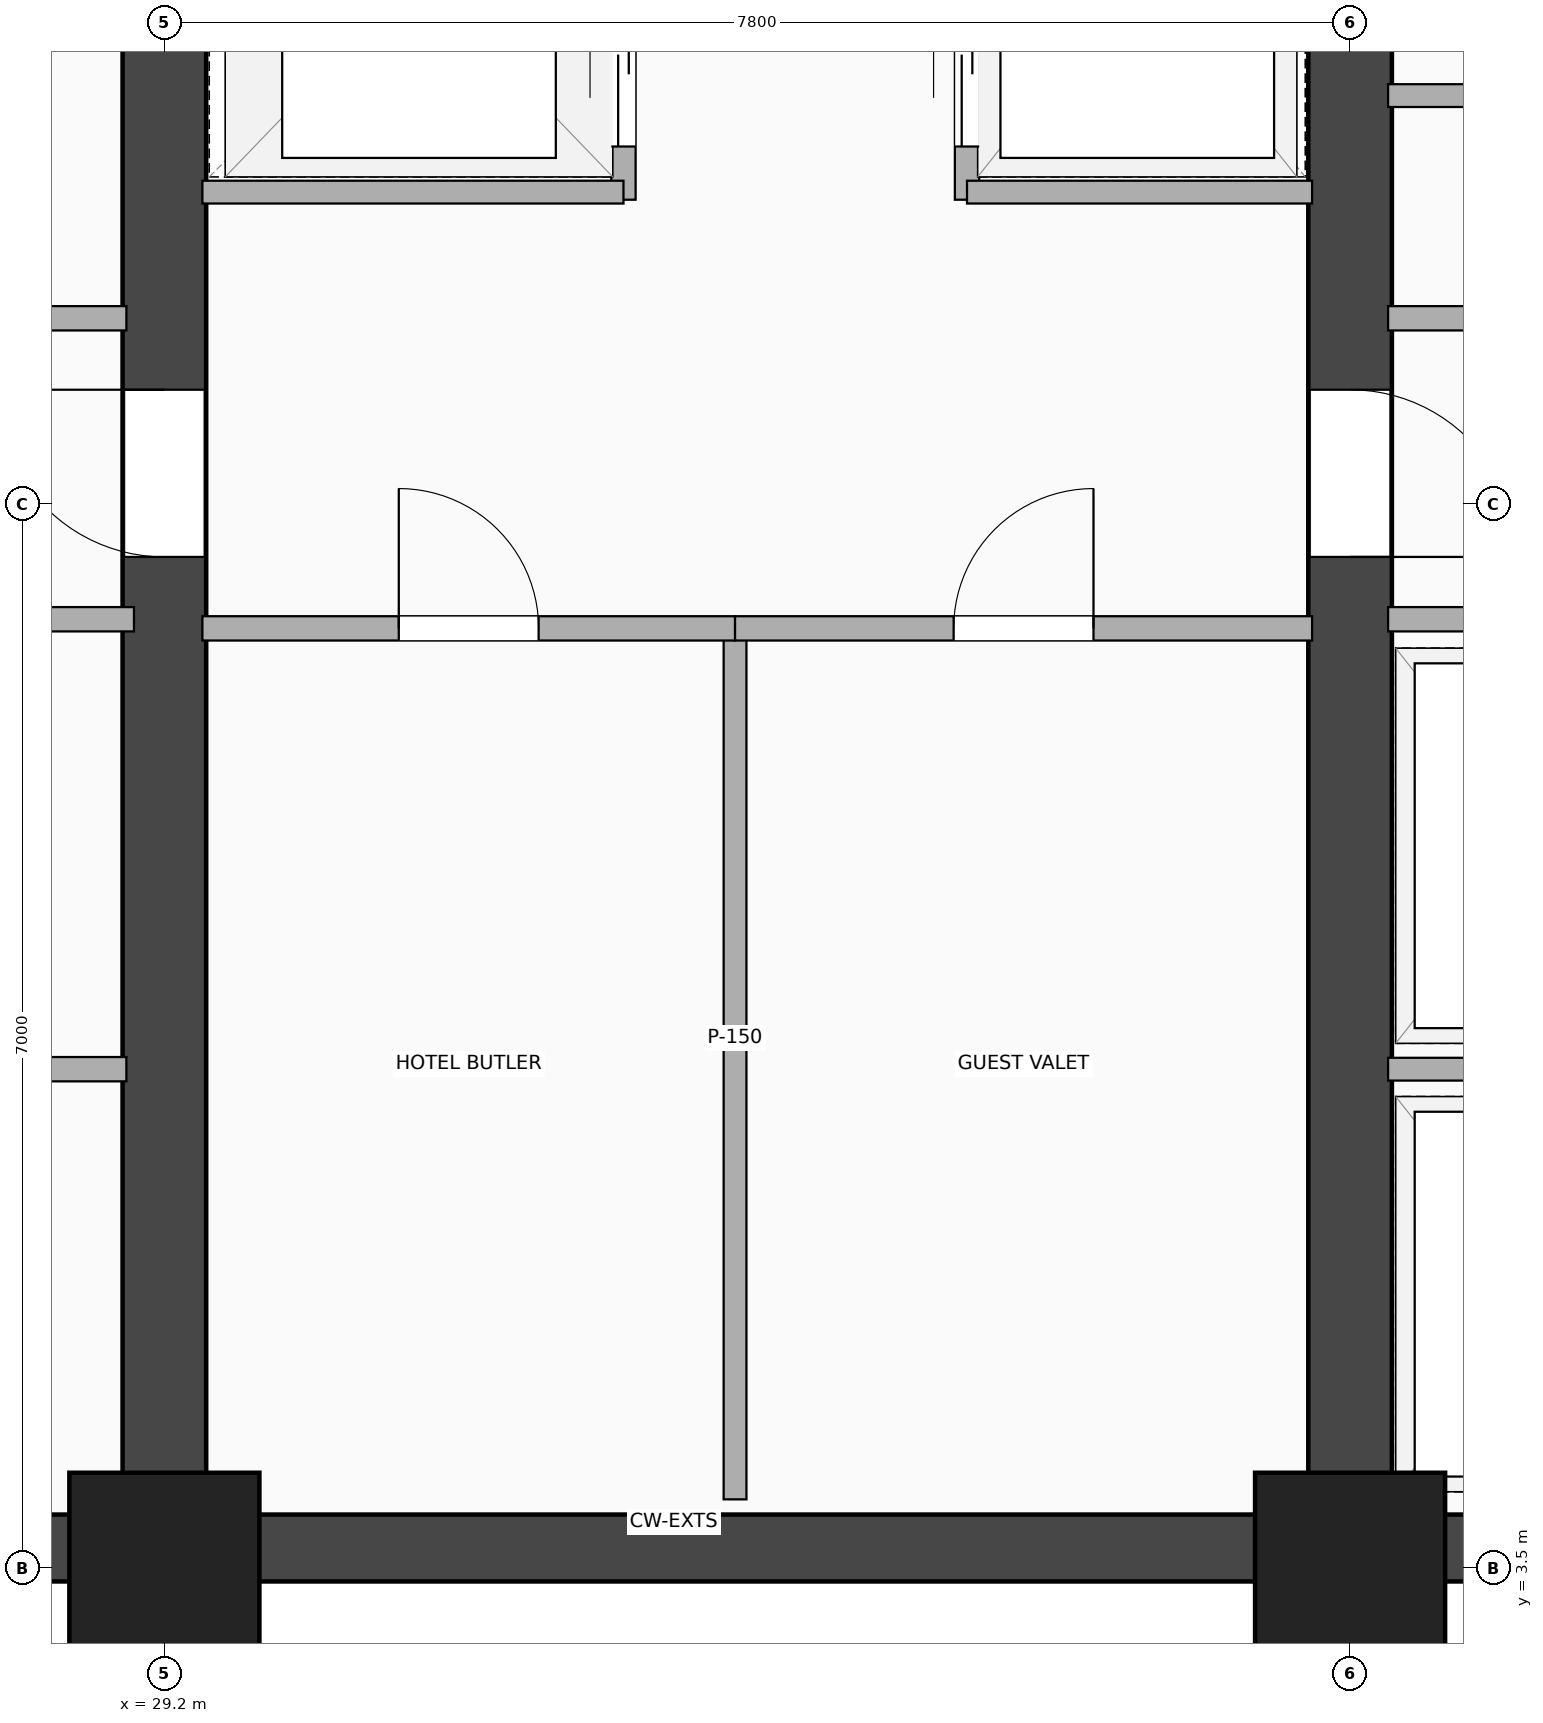
"""IFC4 building model, lengths in metres.
Left out: names, types, materials, properties, quantities, classifications, styles, units other than length and angle.
Written with IfcOpenShell. Run it as: python <this file> out.ifc"""

import sys

from ifc_helpers import new_model, si_unit, direction, frame, frame_2d, origin, origin_2d, place, context, subcontext, project, spatial, rectangle, extrude, element, fill, save


model = new_model("IFC4")
c1 = context("Model", 3, precision=1e-05, world=origin(), true_north=direction((0.0, 1.0)))
c2 = subcontext(c1, "Body", "Model", "MODEL_VIEW")
j1 = project(units=[si_unit("LENGTHUNIT", "METRE"), si_unit("PLANEANGLEUNIT", "RADIAN")], contexts=[c1])
p1 = place(None, origin())
s1 = spatial("IfcSite", under=j1, at=p1, CompositionType="ELEMENT")
p2 = place(p1, origin())
s2 = spatial("IfcBuilding", under=s1, at=p2, CompositionType="ELEMENT")
p3 = place(p2, frame((0.0, 0.0, 112.7)))
s3 = spatial("IfcBuildingStorey", under=s2, at=p3, CompositionType="ELEMENT", Elevation=112.7)
p4 = place(p3, frame((20.3, 3.63, 0.0), z_axis=(0.0, 0.0, 1.0), x_axis=(1.0, 0.0, 0.0)))
e1 = element("IfcWall", 1, at=p4, inside=s3, PredefinedType="SHEAR", context=c2, shape_type="SweptSolid", body=[
    extrude(rectangle(XDim=24.5, YDim=0.44, at=frame_2d((12.25, 0.0))), origin(), (0.0, 0.0, 1.0), 3.24),
])
p5 = place(p3, frame((29.2, 3.5, 0.0), z_axis=(0.0, 0.0, 1.0), x_axis=(0.0, 1.0, 0.0)))
e2 = element("IfcWall", 2, at=p5, inside=s3, PredefinedType="SHEAR", context=c2, shape_type="SweptSolid", body=[
    extrude(rectangle(XDim=16.9, YDim=0.55, at=frame_2d((8.45, 0.0))), origin(), (0.0, 0.0, 1.0), 3.24),
])
p6 = place(p5, frame((7.75, 0.0, 0.0), z_axis=(0.0, 0.0, 1.0), x_axis=(-1.0, 0.0, 0.0)))
e3 = element("IfcOpeningElement", 3, at=p6, cuts=e2, PredefinedType="OPENING", context=c2, shape_type="SweptSolid", body=[
    extrude(rectangle(XDim=1.1, YDim=2.15, at=frame_2d((0.55, 1.075))), frame((0.0, 0.285, 0.0), z_axis=(0.0, -1.0, 0.0), x_axis=(1.0, 0.0, 0.0)), (0.0, 0.0, 1.0), 0.57),
])
p7 = place(p3, frame((37.0, 3.5, 0.0), z_axis=(0.0, 0.0, 1.0), x_axis=(0.0, 1.0, 0.0)))
e4 = element("IfcWall", 4, at=p7, inside=s3, PredefinedType="SHEAR", context=c2, shape_type="SweptSolid", body=[
    extrude(rectangle(XDim=16.9, YDim=0.55, at=frame_2d((8.45, 0.0))), origin(), (0.0, 0.0, 1.0), 3.24),
])
p8 = place(p7, frame((6.65, 0.0, 0.0)))
e5 = element("IfcOpeningElement", 5, at=p8, cuts=e4, PredefinedType="OPENING", context=c2, shape_type="SweptSolid", body=[
    extrude(rectangle(XDim=1.1, YDim=2.15, at=frame_2d((0.55, 1.075))), frame((0.0, 0.285, 0.0), z_axis=(0.0, -1.0, 0.0), x_axis=(1.0, 0.0, 0.0)), (0.0, 0.0, 1.0), 0.57),
])
for number, where, z_axis, x_axis in (
    (6, (29.2, 3.5, -0.26), (0.0, 0.0, 1.0), (1.0, 0.0, 0.0)),
    (7, (37.0, 3.5, -0.26), (0.0, 0.0, 1.0), (1.0, 0.0, 0.0)),
):
    element("IfcColumn", number, at=place(p3, frame(where, z_axis=z_axis, x_axis=x_axis)), inside=s3, PredefinedType="COLUMN", context=c2, shape_type="SweptSolid", body=[
        extrude(rectangle(XDim=1.25, YDim=1.25, at=origin_2d()), origin(), (0.0, 0.0, 1.0), 3.5),
    ])
p9 = place(p3, frame((26.49, 11.72, 0.0), z_axis=(0.0, 0.0, 1.0), x_axis=(1.0, 0.0, 0.0)))
e8 = element("IfcWall", 8, at=p9, inside=s3, PredefinedType="PARTITIONING", context=c2, shape_type="SweptSolid", body=[
    extrude(rectangle(XDim=2.459, YDim=0.16, at=frame_2d((1.23, 0.0))), origin(), (0.0, 0.0, 1.0), 3.24),
])
p10 = place(p9, frame((0.77, 0.0, 0.0)))
e9 = element("IfcOpeningElement", 9, at=p10, cuts=e8, PredefinedType="OPENING", context=c2, shape_type="SweptSolid", body=[
    extrude(rectangle(XDim=0.92, YDim=2.08, at=frame_2d((0.46, 1.04))), frame((0.0, 0.09, 0.0), z_axis=(0.0, -1.0, 0.0), x_axis=(1.0, 0.0, 0.0)), (0.0, 0.0, 1.0), 0.18),
])
p11 = place(p3, frame((37.25, 11.72, 0.0), z_axis=(0.0, 0.0, 1.0), x_axis=(1.0, 0.0, 0.0)))
e10 = element("IfcWall", 10, at=p11, inside=s3, PredefinedType="PARTITIONING", context=c2, shape_type="SweptSolid", body=[
    extrude(rectangle(XDim=3.61, YDim=0.16, at=frame_2d((1.805, 0.0))), origin(), (0.0, 0.0, 1.0), 3.24),
])
p12 = place(p11, frame((1.345, 0.0, 0.0)))
e11 = element("IfcOpeningElement", 11, at=p12, cuts=e10, PredefinedType="OPENING", context=c2, shape_type="SweptSolid", body=[
    extrude(rectangle(XDim=0.92, YDim=2.08, at=frame_2d((0.46, 1.04))), frame((0.0, 0.09, 0.0), z_axis=(0.0, -1.0, 0.0), x_axis=(1.0, 0.0, 0.0)), (0.0, 0.0, 1.0), 0.18),
])
p13 = place(p3, frame((37.25, 13.185, 0.0), z_axis=(0.0, 0.0, 1.0), x_axis=(1.0, 0.0, 0.0)))
e12 = element("IfcWall", 12, at=p13, inside=s3, PredefinedType="PARTITIONING", context=c2, shape_type="SweptSolid", body=[
    extrude(rectangle(XDim=3.61, YDim=0.15, at=frame_2d((1.805, 0.0))), origin(), (0.0, 0.0, 1.0), 3.24),
])
p14 = place(p13, frame((1.365, 0.0, 0.0)))
e13 = element("IfcOpeningElement", 13, at=p14, cuts=e12, PredefinedType="OPENING", context=c2, shape_type="SweptSolid", body=[
    extrude(rectangle(XDim=0.88, YDim=2.08, at=frame_2d((0.44, 1.04))), frame((0.0, 0.085, 0.0), z_axis=(0.0, -1.0, 0.0), x_axis=(1.0, 0.0, 0.0)), (0.0, 0.0, 1.0), 0.17),
])
p15 = place(p3, frame((20.65, 6.78, 0.0), z_axis=(0.0, 0.0, 1.0), x_axis=(1.0, 0.0, 0.0)))
e14 = element("IfcWall", 14, at=p15, inside=s3, PredefinedType="PARTITIONING", context=c2, shape_type="SweptSolid", body=[
    extrude(rectangle(XDim=8.3, YDim=0.16, at=frame_2d((4.15, 0.0))), origin(), (0.0, 0.0, 1.0), 2.313),
])
p16 = place(p15, frame((3.695, 0.0, 0.0)))
e15 = element("IfcOpeningElement", 15, at=p16, cuts=e14, PredefinedType="OPENING", context=c2, shape_type="SweptSolid", body=[
    extrude(rectangle(XDim=1.15, YDim=2.2, at=frame_2d((0.575, 1.1))), frame((0.0, 0.09, 0.0), z_axis=(0.0, -1.0, 0.0), x_axis=(1.0, 0.0, 0.0)), (0.0, 0.0, 1.0), 0.18),
])
p17 = place(p15, frame((5.492, 0.0, 0.0)))
e16 = element("IfcOpeningElement", 16, at=p17, cuts=e14, PredefinedType="OPENING", context=c2, shape_type="SweptSolid", body=[
    extrude(rectangle(XDim=1.15, YDim=2.2, at=frame_2d((0.575, 1.1))), frame((0.0, 0.09, 0.0), z_axis=(0.0, -1.0, 0.0), x_axis=(1.0, 0.0, 0.0)), (0.0, 0.0, 1.0), 0.18),
])
p18 = place(p15, frame((1.059, 0.0, 0.0)))
e17 = element("IfcOpeningElement", 17, at=p18, cuts=e14, PredefinedType="OPENING", context=c2, shape_type="SweptSolid", body=[
    extrude(rectangle(XDim=1.15, YDim=2.2, at=frame_2d((0.575, 1.1))), frame((0.0, 0.09, 0.0), z_axis=(0.0, -1.0, 0.0), x_axis=(1.0, 0.0, 0.0)), (0.0, 0.0, 1.0), 0.18),
])
p19 = place(p3, frame((24.2, 9.74, 0.0), z_axis=(0.0, 0.0, 1.0), x_axis=(1.0, 0.0, 0.0)))
e18 = element("IfcWall", 18, at=p19, inside=s3, PredefinedType="PARTITIONING", context=c2, shape_type="SweptSolid", body=[
    extrude(rectangle(XDim=4.8, YDim=0.16, at=frame_2d((2.4, 0.0))), origin(), (0.0, 0.0, 1.0), 3.24),
])
p20 = place(p19, frame((1.85, 0.0, 0.0)))
e19 = element("IfcOpeningElement", 19, at=p20, cuts=e18, PredefinedType="OPENING", context=c2, shape_type="SweptSolid", body=[
    extrude(rectangle(XDim=1.1, YDim=2.15, at=frame_2d((0.55, 1.075))), frame((0.0, 0.09, 0.0), z_axis=(0.0, -1.0, 0.0), x_axis=(1.0, 0.0, 0.0)), (0.0, 0.0, 1.0), 0.18),
])
p21 = place(p3, frame((37.25, 6.78, 0.0), z_axis=(0.0, 0.0, 1.0), x_axis=(1.0, 0.0, 0.0)))
e20 = element("IfcWall", 20, at=p21, inside=s3, PredefinedType="PARTITIONING", context=c2, shape_type="SweptSolid", body=[
    extrude(rectangle(XDim=2.17, YDim=0.15, at=frame_2d((1.085, 0.0))), origin(), (0.0, 0.0, 1.0), 3.24),
])
p22 = place(p3, frame((37.25, 9.74, 0.0), z_axis=(0.0, 0.0, 1.0), x_axis=(1.0, 0.0, 0.0)))
e21 = element("IfcWall", 21, at=p22, inside=s3, PredefinedType="PARTITIONING", context=c2, shape_type="SweptSolid", body=[
    extrude(rectangle(XDim=2.17, YDim=0.16, at=frame_2d((1.085, 0.0))), origin(), (0.0, 0.0, 1.0), 3.24),
])
p23 = place(p3, frame((32.954, 3.95, 0.0), z_axis=(0.0, 0.0, 1.0), x_axis=(0.0, 1.0, 0.0)))
e22 = element("IfcWall", 22, at=p23, inside=s3, PredefinedType="PARTITIONING", context=c2, shape_type="SweptSolid", body=[
    extrude(rectangle(XDim=5.73, YDim=0.15, at=frame_2d((2.865, 0.0))), origin(), (0.0, 0.0, 1.0), 3.24),
])
p24 = place(p3, frame((29.45, 9.68, 0.0), z_axis=(0.0, 0.0, 1.0), x_axis=(1.0, 0.0, 0.0)))
e23 = element("IfcWall", 23, at=p24, inside=s3, PredefinedType="PARTITIONING", context=c2, shape_type="SweptSolid", body=[
    extrude(rectangle(XDim=3.504, YDim=0.16, at=frame_2d((1.752, 0.0))), origin(), (0.0, 0.0, 1.0), 3.24),
])
p25 = place(p24, frame((2.212, 0.0, 0.0), z_axis=(0.0, 0.0, 1.0), x_axis=(-1.0, 0.0, 0.0)))
e24 = element("IfcOpeningElement", 24, at=p25, cuts=e23, PredefinedType="OPENING", context=c2, shape_type="SweptSolid", body=[
    extrude(rectangle(XDim=0.92, YDim=2.08, at=frame_2d((0.46, 1.04))), frame((0.0, 0.09, 0.0), z_axis=(0.0, -1.0, 0.0), x_axis=(1.0, 0.0, 0.0)), (0.0, 0.0, 1.0), 0.18),
])
p26 = place(p3, frame((32.954, 9.68, 0.0), z_axis=(0.0, 0.0, 1.0), x_axis=(1.0, 0.0, 0.0)))
e25 = element("IfcWall", 25, at=p26, inside=s3, PredefinedType="PARTITIONING", context=c2, shape_type="SweptSolid", body=[
    extrude(rectangle(XDim=3.796, YDim=0.16, at=frame_2d((1.898, 0.0))), origin(), (0.0, 0.0, 1.0), 3.24),
])
p27 = place(p26, frame((2.358, 0.0, 0.0), z_axis=(0.0, 0.0, 1.0), x_axis=(-1.0, 0.0, 0.0)))
e26 = element("IfcOpeningElement", 26, at=p27, cuts=e25, PredefinedType="OPENING", context=c2, shape_type="SweptSolid", body=[
    extrude(rectangle(XDim=0.92, YDim=2.08, at=frame_2d((0.46, 1.04))), frame((0.0, 0.09, 0.0), z_axis=(0.0, -1.0, 0.0), x_axis=(1.0, 0.0, 0.0)), (0.0, 0.0, 1.0), 0.18),
])
p28 = place(p3, frame((32.22, 12.5, 0.0), z_axis=(0.0, 0.0, 1.0), x_axis=(0.0, 1.0, 0.0)))
e27 = element("IfcWall", 27, at=p28, inside=s3, PredefinedType="PARTITIONING", context=c2, shape_type="SweptSolid", body=[
    extrude(rectangle(XDim=7.92, YDim=0.16, at=frame_2d((3.96, 0.0))), origin(), (0.0, 0.0, 1.0), 2.614),
])
p29 = place(p28, frame((1.43, 0.0, 0.0), z_axis=(0.0, 0.0, 1.0), x_axis=(-1.0, 0.0, 0.0)))
e28 = element("IfcOpeningElement", 28, at=p29, cuts=e27, PredefinedType="OPENING", context=c2, shape_type="SweptSolid", body=[
    extrude(rectangle(XDim=1.08, YDim=2.16, at=frame_2d((0.54, 1.08))), frame((0.0, 0.09, 0.0), z_axis=(0.0, -1.0, 0.0), x_axis=(1.0, 0.0, 0.0)), (0.0, 0.0, 1.0), 0.18),
])
p30 = place(p28, frame((4.33, 0.0, 0.0), z_axis=(0.0, 0.0, 1.0), x_axis=(-1.0, 0.0, 0.0)))
e29 = element("IfcOpeningElement", 29, at=p30, cuts=e27, PredefinedType="OPENING", context=c2, shape_type="SweptSolid", body=[
    extrude(rectangle(XDim=1.08, YDim=2.16, at=frame_2d((0.54, 1.08))), frame((0.0, 0.09, 0.0), z_axis=(0.0, -1.0, 0.0), x_axis=(1.0, 0.0, 0.0)), (0.0, 0.0, 1.0), 0.18),
])
p31 = place(p28, frame((6.1, 0.0, 0.0)))
e30 = element("IfcOpeningElement", 30, at=p31, cuts=e27, PredefinedType="OPENING", context=c2, shape_type="SweptSolid", body=[
    extrude(rectangle(XDim=0.88, YDim=2.08, at=frame_2d((0.44, 1.04))), frame((0.0, 0.09, 0.0), z_axis=(0.0, -1.0, 0.0), x_axis=(1.0, 0.0, 0.0)), (0.0, 0.0, 1.0), 0.18),
])
p32 = place(p3, frame((34.48, 12.5, 0.0), z_axis=(0.0, 0.0, 1.0), x_axis=(0.0, 1.0, 0.0)))
e31 = element("IfcWall", 31, at=p32, inside=s3, PredefinedType="PARTITIONING", context=c2, shape_type="SweptSolid", body=[
    extrude(rectangle(XDim=7.92, YDim=0.16, at=frame_2d((3.96, 0.0))), origin(), (0.0, 0.0, 1.0), 2.614),
])
p33 = place(p32, frame((0.35, 0.0, 0.0)))
e32 = element("IfcOpeningElement", 32, at=p33, cuts=e31, PredefinedType="OPENING", context=c2, shape_type="SweptSolid", body=[
    extrude(rectangle(XDim=1.08, YDim=2.16, at=frame_2d((0.54, 1.08))), frame((0.0, 0.09, 0.0), z_axis=(0.0, -1.0, 0.0), x_axis=(1.0, 0.0, 0.0)), (0.0, 0.0, 1.0), 0.18),
])
p34 = place(p32, frame((3.25, 0.0, 0.0)))
e33 = element("IfcOpeningElement", 33, at=p34, cuts=e31, PredefinedType="OPENING", context=c2, shape_type="SweptSolid", body=[
    extrude(rectangle(XDim=1.08, YDim=2.16, at=frame_2d((0.54, 1.08))), frame((0.0, 0.09, 0.0), z_axis=(0.0, -1.0, 0.0), x_axis=(1.0, 0.0, 0.0)), (0.0, 0.0, 1.0), 0.18),
])
p35 = place(p32, frame((6.98, 0.0, 0.0), z_axis=(0.0, 0.0, 1.0), x_axis=(-1.0, 0.0, 0.0)))
e34 = element("IfcOpeningElement", 34, at=p35, cuts=e31, PredefinedType="OPENING", context=c2, shape_type="SweptSolid", body=[
    extrude(rectangle(XDim=0.88, YDim=2.08, at=frame_2d((0.44, 1.04))), frame((0.0, 0.09, 0.0), z_axis=(0.0, -1.0, 0.0), x_axis=(1.0, 0.0, 0.0)), (0.0, 0.0, 1.0), 0.18),
])
p36 = place(p3, frame((29.45, 12.55, 0.0), z_axis=(0.0, 0.0, 1.0), x_axis=(1.0, 0.0, 0.0)))
e35 = element("IfcWall", 35, at=p36, inside=s3, PredefinedType="PARTITIONING", context=c2, shape_type="SweptSolid", body=[
    extrude(rectangle(XDim=2.77, YDim=0.15, at=frame_2d((1.385, 0.0))), origin(), (0.0, 0.0, 1.0), 3.24),
])
p37 = place(p3, frame((34.48, 12.55, 0.0), z_axis=(0.0, 0.0, 1.0), x_axis=(1.0, 0.0, 0.0)))
e36 = element("IfcWall", 36, at=p37, inside=s3, PredefinedType="PARTITIONING", context=c2, shape_type="SweptSolid", body=[
    extrude(rectangle(XDim=2.27, YDim=0.15, at=frame_2d((1.135, 0.0))), origin(), (0.0, 0.0, 1.0), 3.24),
])
p38 = place(p6, origin())
e37 = element("IfcDoor", 37, at=p38, inside=s3, OperationType="SINGLE_SWING_RIGHT", PredefinedType="DOOR", context=c2, shape_type="SweptSolid", body=[
    extrude(rectangle(XDim=1.1, YDim=2.15, at=frame_2d((0.55, 1.075))), frame((0.0, 0.025, 0.0), z_axis=(0.0, -1.0, 0.0), x_axis=(1.0, 0.0, 0.0)), (0.0, 0.0, 1.0), 0.05),
])
fill(e3, e37)
p39 = place(p8, origin())
e38 = element("IfcDoor", 38, at=p39, inside=s3, OperationType="SINGLE_SWING_LEFT", PredefinedType="DOOR", context=c2, shape_type="SweptSolid", body=[
    extrude(rectangle(XDim=1.1, YDim=2.15, at=frame_2d((0.55, 1.075))), frame((0.0, 0.025, 0.0), z_axis=(0.0, -1.0, 0.0), x_axis=(1.0, 0.0, 0.0)), (0.0, 0.0, 1.0), 0.05),
])
fill(e5, e38)
p40 = place(p25, origin())
e39 = element("IfcDoor", 39, at=p40, inside=s3, OperationType="SINGLE_SWING_LEFT", PredefinedType="DOOR", context=c2, shape_type="SweptSolid", body=[
    extrude(rectangle(XDim=0.92, YDim=2.08, at=frame_2d((0.46, 1.04))), frame((0.0, 0.025, 0.0), z_axis=(0.0, -1.0, 0.0), x_axis=(1.0, 0.0, 0.0)), (0.0, 0.0, 1.0), 0.05),
])
fill(e24, e39)
p41 = place(p27, origin())
e40 = element("IfcDoor", 40, at=p41, inside=s3, OperationType="SINGLE_SWING_RIGHT", PredefinedType="DOOR", context=c2, shape_type="SweptSolid", body=[
    extrude(rectangle(XDim=0.92, YDim=2.08, at=frame_2d((0.46, 1.04))), frame((0.0, 0.025, 0.0), z_axis=(0.0, -1.0, 0.0), x_axis=(1.0, 0.0, 0.0)), (0.0, 0.0, 1.0), 0.05),
])
fill(e26, e40)
p42 = place(p29, origin())
e41 = element("IfcDoor", 41, at=p42, inside=s3, OperationType="DOUBLE_DOOR_SLIDING", PredefinedType="DOOR", context=c2, shape_type="SweptSolid", body=[
    extrude(rectangle(XDim=1.08, YDim=2.16, at=frame_2d((0.54, 1.08))), frame((0.0, 0.025, 0.0), z_axis=(0.0, -1.0, 0.0), x_axis=(1.0, 0.0, 0.0)), (0.0, 0.0, 1.0), 0.05),
])
fill(e28, e41)
p43 = place(p33, origin())
e42 = element("IfcDoor", 42, at=p43, inside=s3, OperationType="DOUBLE_DOOR_SLIDING", PredefinedType="DOOR", context=c2, shape_type="SweptSolid", body=[
    extrude(rectangle(XDim=1.08, YDim=2.16, at=frame_2d((0.54, 1.08))), frame((0.0, 0.025, 0.0), z_axis=(0.0, -1.0, 0.0), x_axis=(1.0, 0.0, 0.0)), (0.0, 0.0, 1.0), 0.05),
])
fill(e32, e42)
save(model, sys.argv[1])
